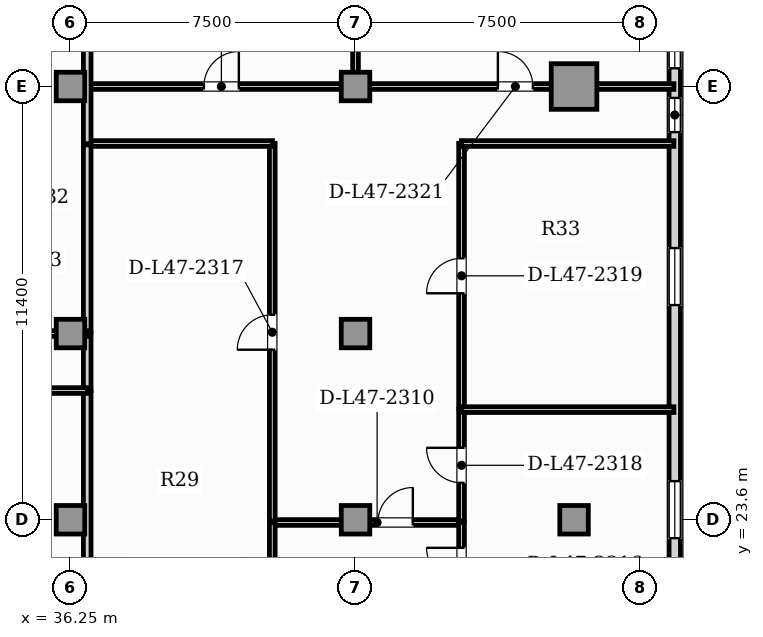
"""IFC4 building model, lengths in metres.
Left out: names, types, materials, properties, quantities, classifications, styles, units other than length and angle.
Written with IfcOpenShell. Run it as: python <this file> out.ifc"""

import sys

from ifc_helpers import new_model, si_unit, direction, frame, frame_2d, origin, origin_2d, place, context, subcontext, project, spatial, rectangle, hollow_rectangle, extrude, element, fill, save


model = new_model("IFC4")
c1 = context("Model", 3, precision=1e-05, world=origin(), true_north=direction((0.0, 1.0)))
c2 = subcontext(c1, "Body", "Model", "MODEL_VIEW")
j1 = project(units=[si_unit("LENGTHUNIT", "METRE"), si_unit("PLANEANGLEUNIT", "RADIAN")], contexts=[c1])
p1 = place(None, origin())
s1 = spatial("IfcSite", under=j1, at=p1, CompositionType="ELEMENT")
p2 = place(p1, origin())
s2 = spatial("IfcBuilding", under=s1, at=p2, CompositionType="ELEMENT")
p3 = place(p2, frame((0.0, 0.0, 192.6)))
s3 = spatial("IfcBuildingStorey", under=s2, at=p3, CompositionType="ELEMENT", Elevation=192.6)
p4 = place(p3, frame((49.5, 35.0, 0.0), z_axis=(0.0, 0.0, 1.0), x_axis=(1.0, 0.0, 0.0)))
e1 = element("IfcColumn", 1, at=p4, inside=s3, PredefinedType="USERDEFINED", context=c2, shape_type="SweptSolid", body=[
    extrude(hollow_rectangle(XDim=1.2, YDim=1.2, WallThickness=0.07, at=origin_2d()), origin(), (0.0, 0.0, 1.0), 3.85),
])
for number, where, z_axis, x_axis in (
    (2, (36.25, 23.6, 0.0), (0.0, 0.0, 1.0), (1.0, 0.0, 0.0)),
    (3, (43.75, 23.6, 0.0), (0.0, 0.0, 1.0), (1.0, 0.0, 0.0)),
    (4, (49.5, 23.6, 0.0), (0.0, 0.0, 1.0), (1.0, 0.0, 0.0)),
    (5, (36.25, 28.5, 0.0), (0.0, 0.0, 1.0), (1.0, 0.0, 0.0)),
    (6, (43.75, 28.5, 0.0), (0.0, 0.0, 1.0), (1.0, 0.0, 0.0)),
    (7, (36.25, 35.0, 0.0), (0.0, 0.0, 1.0), (1.0, 0.0, 0.0)),
    (8, (43.75, 35.0, 0.0), (0.0, 0.0, 1.0), (1.0, 0.0, 0.0)),
):
    element("IfcColumn", number, at=place(p3, frame(where, z_axis=z_axis, x_axis=x_axis)), inside=s3, PredefinedType="COLUMN", context=c2, shape_type="SweptSolid", body=[
        extrude(rectangle(XDim=0.75, YDim=0.75, at=origin_2d()), origin(), (0.0, 0.0, 1.0), 3.85),
    ])
p5 = place(p3, frame((52.15, 3.24, 0.0), z_axis=(0.0, 0.0, 1.0), x_axis=(0.0, 1.0, 0.0)))
e9 = element("IfcWall", 9, at=p5, inside=s3, PredefinedType="SOLIDWALL", context=c2, shape_type="SweptSolid", body=[
    extrude(rectangle(XDim=33.92, YDim=0.3, at=frame_2d((16.96, 0.0))), origin(), (0.0, 0.0, 1.0), 3.63),
])
p6 = place(p5, frame((30.56, 0.0, 0.95)))
e10 = element("IfcOpeningElement", 10, at=p6, cuts=e9, PredefinedType="OPENING", context=c2, shape_type="SweptSolid", body=[
    extrude(rectangle(XDim=0.9, YDim=1.5, at=frame_2d((0.45, 0.75))), frame((0.0, 0.16, 0.0), z_axis=(0.0, -1.0, 0.0), x_axis=(1.0, 0.0, 0.0)), (0.0, 0.0, 1.0), 0.32),
])
p7 = place(p5, frame((10.88, 0.0, 0.9)))
e11 = element("IfcOpeningElement", 11, at=p7, cuts=e9, PredefinedType="OPENING", context=c2, shape_type="SweptSolid", body=[
    extrude(rectangle(XDim=1.5, YDim=1.95, at=frame_2d((0.75, 0.975))), frame((0.0, 0.16, 0.0), z_axis=(0.0, -1.0, 0.0), x_axis=(1.0, 0.0, 0.0)), (0.0, 0.0, 1.0), 0.32),
])
p8 = place(p5, frame((14.613, 0.0, 0.9)))
e12 = element("IfcOpeningElement", 12, at=p8, cuts=e9, PredefinedType="OPENING", context=c2, shape_type="SweptSolid", body=[
    extrude(rectangle(XDim=1.5, YDim=1.95, at=frame_2d((0.75, 0.975))), frame((0.0, 0.16, 0.0), z_axis=(0.0, -1.0, 0.0), x_axis=(1.0, 0.0, 0.0)), (0.0, 0.0, 1.0), 0.32),
])
p9 = place(p5, frame((19.876, 0.0, 0.9)))
e13 = element("IfcOpeningElement", 13, at=p9, cuts=e9, PredefinedType="OPENING", context=c2, shape_type="SweptSolid", body=[
    extrude(rectangle(XDim=1.5, YDim=1.95, at=frame_2d((0.75, 0.975))), frame((0.0, 0.16, 0.0), z_axis=(0.0, -1.0, 0.0), x_axis=(1.0, 0.0, 0.0)), (0.0, 0.0, 1.0), 0.32),
])
p10 = place(p5, frame((26.009, 0.0, 0.9)))
e14 = element("IfcOpeningElement", 14, at=p10, cuts=e9, PredefinedType="OPENING", context=c2, shape_type="SweptSolid", body=[
    extrude(rectangle(XDim=1.5, YDim=1.95, at=frame_2d((0.75, 0.975))), frame((0.0, 0.16, 0.0), z_axis=(0.0, -1.0, 0.0), x_axis=(1.0, 0.0, 0.0)), (0.0, 0.0, 1.0), 0.32),
])
p11 = place(p5, frame((32.24, 0.0, 0.95)))
e15 = element("IfcOpeningElement", 15, at=p11, cuts=e9, PredefinedType="OPENING", context=c2, shape_type="SweptSolid", body=[
    extrude(rectangle(XDim=0.9, YDim=1.5, at=frame_2d((0.45, 0.75))), frame((0.0, 0.16, 0.0), z_axis=(0.0, -1.0, 0.0), x_axis=(1.0, 0.0, 0.0)), (0.0, 0.0, 1.0), 0.32),
])
p12 = place(p3, frame((41.555, 23.528, 0.0), z_axis=(0.0, 0.0, 1.0), x_axis=(1.0, 0.0, 0.0)))
e16 = element("IfcWall", 16, at=p12, inside=s3, PredefinedType="PARTITIONING", context=c2, shape_type="SweptSolid", body=[
    extrude(rectangle(XDim=4.99, YDim=0.15, at=frame_2d((2.495, 0.0))), origin(), (0.0, 0.0, 1.0), 3.085),
])
p13 = place(p12, frame((2.783, 0.0, 0.0)))
e17 = element("IfcOpeningElement", 17, at=p13, cuts=e16, PredefinedType="OPENING", context=c2, shape_type="SweptSolid", body=[
    extrude(rectangle(XDim=0.92, YDim=2.1, at=frame_2d((0.46, 1.05))), frame((0.0, 0.085, 0.0), z_axis=(0.0, -1.0, 0.0), x_axis=(1.0, 0.0, 0.0)), (0.0, 0.0, 1.0), 0.17),
])
p14 = place(p3, frame((41.56, 17.862, 0.0), z_axis=(0.0, 0.0, 1.0), x_axis=(0.0, 1.0, 0.0)))
e18 = element("IfcWall", 18, at=p14, inside=s3, PredefinedType="PARTITIONING", context=c2, shape_type="SweptSolid", body=[
    extrude(rectangle(XDim=5.671, YDim=0.15, at=frame_2d((2.835, 0.0))), origin(), (0.0, 0.0, 1.0), 3.63),
])
p15 = place(p14, frame((2.375, 0.0, 0.0)))
e19 = element("IfcOpeningElement", 19, at=p15, cuts=e18, PredefinedType="OPENING", context=c2, shape_type="SweptSolid", body=[
    extrude(rectangle(XDim=0.92, YDim=2.1, at=frame_2d((0.46, 1.05))), frame((0.0, 0.085, 0.0), z_axis=(0.0, -1.0, 0.0), x_axis=(1.0, 0.0, 0.0)), (0.0, 0.0, 1.0), 0.17),
])
p16 = place(p3, frame((46.54, 21.27, 0.0), z_axis=(0.0, 0.0, 1.0), x_axis=(0.0, 1.0, 0.0)))
e20 = element("IfcWall", 20, at=p16, inside=s3, PredefinedType="PARTITIONING", context=c2, shape_type="SweptSolid", body=[
    extrude(rectangle(XDim=2.264, YDim=0.15, at=frame_2d((1.132, 0.0))), origin(), (0.0, 0.0, 1.0), 3.63),
])
p17 = place(p16, frame((0.672, 0.0, 0.0)))
e21 = element("IfcOpeningElement", 21, at=p17, cuts=e20, PredefinedType="OPENING", context=c2, shape_type="SweptSolid", body=[
    extrude(rectangle(XDim=0.92, YDim=2.1, at=frame_2d((0.46, 1.05))), frame((0.0, 0.085, 0.0), z_axis=(0.0, -1.0, 0.0), x_axis=(1.0, 0.0, 0.0)), (0.0, 0.0, 1.0), 0.17),
])
p18 = place(p3, frame((41.56, 23.563, 0.0), z_axis=(0.0, 0.0, 1.0), x_axis=(0.0, 1.0, 0.0)))
e22 = element("IfcWall", 22, at=p18, inside=s3, PredefinedType="PARTITIONING", context=c2, shape_type="SweptSolid", body=[
    extrude(rectangle(XDim=9.942, YDim=0.15, at=frame_2d((4.971, 0.0))), origin(), (0.0, 0.0, 1.0), 3.63),
])
p19 = place(p18, frame((4.511, 0.0, 0.0)))
e23 = element("IfcOpeningElement", 23, at=p19, cuts=e22, PredefinedType="OPENING", context=c2, shape_type="SweptSolid", body=[
    extrude(rectangle(XDim=0.92, YDim=2.1, at=frame_2d((0.46, 1.05))), frame((0.0, 0.085, 0.0), z_axis=(0.0, -1.0, 0.0), x_axis=(1.0, 0.0, 0.0)), (0.0, 0.0, 1.0), 0.17),
])
p20 = place(p3, frame((36.685, 33.5, 0.0), z_axis=(0.0, 0.0, 1.0), x_axis=(1.0, 0.0, 0.0)))
e24 = element("IfcWall", 24, at=p20, inside=s3, PredefinedType="PARTITIONING", context=c2, shape_type="SweptSolid", body=[
    extrude(rectangle(XDim=4.88, YDim=0.15, at=frame_2d((2.44, 0.0))), origin(), (0.0, 0.0, 1.0), 3.63),
])
p21 = place(p3, frame((46.54, 23.563, 0.0), z_axis=(0.0, 0.0, 1.0), x_axis=(0.0, 1.0, 0.0)))
e25 = element("IfcWall", 25, at=p21, inside=s3, PredefinedType="PARTITIONING", context=c2, shape_type="SweptSolid", body=[
    extrude(rectangle(XDim=2.94, YDim=0.15, at=frame_2d((1.47, 0.0))), origin(), (0.0, 0.0, 1.0), 3.63),
])
p22 = place(p21, frame((1.01, 0.0, 0.0)))
e26 = element("IfcOpeningElement", 26, at=p22, cuts=e25, PredefinedType="OPENING", context=c2, shape_type="SweptSolid", body=[
    extrude(rectangle(XDim=0.92, YDim=2.1, at=frame_2d((0.46, 1.05))), frame((0.0, 0.085, 0.0), z_axis=(0.0, -1.0, 0.0), x_axis=(1.0, 0.0, 0.0)), (0.0, 0.0, 1.0), 0.17),
])
p23 = place(p3, frame((46.54, 26.533, 0.0), z_axis=(0.0, 0.0, 1.0), x_axis=(0.0, 1.0, 0.0)))
e27 = element("IfcWall", 27, at=p23, inside=s3, PredefinedType="PARTITIONING", context=c2, shape_type="SweptSolid", body=[
    extrude(rectangle(XDim=6.972, YDim=0.15, at=frame_2d((3.486, 0.0))), origin(), (0.0, 0.0, 1.0), 3.63),
])
p24 = place(p23, frame((3.026, 0.0, 0.0)))
e28 = element("IfcOpeningElement", 28, at=p24, cuts=e27, PredefinedType="OPENING", context=c2, shape_type="SweptSolid", body=[
    extrude(rectangle(XDim=0.92, YDim=2.1, at=frame_2d((0.46, 1.05))), frame((0.0, 0.085, 0.0), z_axis=(0.0, -1.0, 0.0), x_axis=(1.0, 0.0, 0.0)), (0.0, 0.0, 1.0), 0.17),
])
p25 = place(p3, frame((46.535, 33.5, 0.0), z_axis=(0.0, 0.0, 1.0), x_axis=(1.0, 0.0, 0.0)))
e29 = element("IfcWall", 29, at=p25, inside=s3, PredefinedType="PARTITIONING", context=c2, shape_type="SweptSolid", body=[
    extrude(rectangle(XDim=5.593, YDim=0.15, at=frame_2d((2.796, 0.0))), origin(), (0.0, 0.0, 1.0), 3.63),
])
p26 = place(p3, frame((36.685, 35.0, 0.0), z_axis=(0.0, 0.0, 1.0), x_axis=(1.0, 0.0, 0.0)))
e30 = element("IfcWall", 30, at=p26, inside=s3, PredefinedType="PARTITIONING", context=c2, shape_type="SweptSolid", body=[
    extrude(rectangle(XDim=7.07, YDim=0.15, at=frame_2d((3.535, 0.0))), origin(), (0.0, 0.0, 1.0), 3.085),
])
p27 = place(p26, frame((3.075, 0.0, 0.0)))
e31 = element("IfcOpeningElement", 31, at=p27, cuts=e30, PredefinedType="OPENING", context=c2, shape_type="SweptSolid", body=[
    extrude(rectangle(XDim=0.92, YDim=2.1, at=frame_2d((0.46, 1.05))), frame((0.0, 0.085, 0.0), z_axis=(0.0, -1.0, 0.0), x_axis=(1.0, 0.0, 0.0)), (0.0, 0.0, 1.0), 0.17),
])
p28 = place(p3, frame((43.785, 35.0, 0.0), z_axis=(0.0, 0.0, 1.0), x_axis=(1.0, 0.0, 0.0)))
e32 = element("IfcWall", 32, at=p28, inside=s3, PredefinedType="PARTITIONING", context=c2, shape_type="SweptSolid", body=[
    extrude(rectangle(XDim=8.343, YDim=0.15, at=frame_2d((4.171, 0.0))), origin(), (0.0, 0.0, 1.0), 3.085),
])
p29 = place(p28, frame((3.711, 0.0, 0.0)))
e33 = element("IfcOpeningElement", 33, at=p29, cuts=e32, PredefinedType="OPENING", context=c2, shape_type="SweptSolid", body=[
    extrude(rectangle(XDim=0.92, YDim=2.1, at=frame_2d((0.46, 1.05))), frame((0.0, 0.085, 0.0), z_axis=(0.0, -1.0, 0.0), x_axis=(1.0, 0.0, 0.0)), (0.0, 0.0, 1.0), 0.17),
])
p30 = place(p3, frame((36.69, 33.495, 0.0), z_axis=(0.0, 0.0, 1.0), x_axis=(0.0, 1.0, 0.0)))
e34 = element("IfcWall", 34, at=p30, inside=s3, PredefinedType="PARTITIONING", context=c2, shape_type="SweptSolid", body=[
    extrude(rectangle(XDim=2.638, YDim=0.2, at=frame_2d((1.319, 0.0))), origin(), (0.0, 0.0, 1.0), 3.63),
])
p31 = place(p3, frame((36.69, 26.995, 0.0), z_axis=(0.0, 0.0, 1.0), x_axis=(0.0, 1.0, 0.0)))
e35 = element("IfcWall", 35, at=p31, inside=s3, PredefinedType="PARTITIONING", context=c2, shape_type="SweptSolid", body=[
    extrude(rectangle(XDim=1.51, YDim=0.2, at=frame_2d((0.755, 0.0))), origin(), (0.0, 0.0, 1.0), 3.63),
])
p32 = place(p3, frame((36.69, 20.642, 0.0), z_axis=(0.0, 0.0, 1.0), x_axis=(0.0, 1.0, 0.0)))
e36 = element("IfcWall", 36, at=p32, inside=s3, PredefinedType="PARTITIONING", context=c2, shape_type="SweptSolid", body=[
    extrude(rectangle(XDim=6.323, YDim=0.2, at=frame_2d((3.162, 0.0))), origin(), (0.0, 0.0, 1.0), 3.63),
])
p33 = place(p3, frame((36.69, 28.535, 0.0), z_axis=(0.0, 0.0, 1.0), x_axis=(0.0, 1.0, 0.0)))
e37 = element("IfcWall", 37, at=p33, inside=s3, PredefinedType="PARTITIONING", context=c2, shape_type="SweptSolid", body=[
    extrude(rectangle(XDim=4.93, YDim=0.2, at=frame_2d((2.465, 0.0))), origin(), (0.0, 0.0, 1.0), 3.63),
])
p34 = place(p3, frame((46.535, 26.498, 0.0), z_axis=(0.0, 0.0, 1.0), x_axis=(1.0, 0.0, 0.0)))
e38 = element("IfcWall", 38, at=p34, inside=s3, PredefinedType="PARTITIONING", context=c2, shape_type="SweptSolid", body=[
    extrude(rectangle(XDim=5.593, YDim=0.15, at=frame_2d((2.796, 0.0))), origin(), (0.0, 0.0, 1.0), 3.63),
])
p35 = place(p3, frame((43.75, 34.995, 0.0), z_axis=(0.0, 0.0, 1.0), x_axis=(0.0, 1.0, 0.0)))
e39 = element("IfcWall", 39, at=p35, inside=s3, PredefinedType="PARTITIONING", context=c2, shape_type="SweptSolid", body=[
    extrude(rectangle(XDim=5.232, YDim=0.15, at=frame_2d((2.616, 0.0))), origin(), (0.0, 0.0, 1.0), 3.63),
])
p36 = place(p3, frame((31.3, 27.0, 0.0), z_axis=(0.0, 0.0, 1.0), x_axis=(1.0, 0.0, 0.0)))
e40 = element("IfcWall", 40, at=p36, inside=s3, PredefinedType="PARTITIONING", context=c2, shape_type="SweptSolid", body=[
    extrude(rectangle(XDim=5.395, YDim=0.15, at=frame_2d((2.697, 0.0))), origin(), (0.0, 0.0, 1.0), 3.63),
])
p37 = place(p3, frame((32.281, 28.5, 0.0), z_axis=(0.0, 0.0, 1.0), x_axis=(1.0, 0.0, 0.0)))
e41 = element("IfcWall", 41, at=p37, inside=s3, PredefinedType="PARTITIONING", context=c2, shape_type="SweptSolid", body=[
    extrude(rectangle(XDim=4.414, YDim=0.15, at=frame_2d((2.207, 0.0))), origin(), (0.0, 0.0, 1.0), 3.63),
])
p38 = place(p37, frame((1.747, 0.0, 0.0)))
e42 = element("IfcOpeningElement", 42, at=p38, cuts=e41, PredefinedType="OPENING", context=c2, shape_type="SweptSolid", body=[
    extrude(rectangle(XDim=0.92, YDim=2.1, at=frame_2d((0.46, 1.05))), frame((0.0, 0.085, 0.0), z_axis=(0.0, -1.0, 0.0), x_axis=(1.0, 0.0, 0.0)), (0.0, 0.0, 1.0), 0.17),
])
p39 = place(p6, origin())
e43 = element("IfcWindow", 43, at=p39, inside=s3, PartitioningType="SINGLE_PANEL", PredefinedType="WINDOW", context=c2, shape_type="SweptSolid", body=[
    extrude(rectangle(XDim=0.9, YDim=1.5, at=frame_2d((0.45, 0.75))), frame((0.0, 0.03, 0.0), z_axis=(0.0, -1.0, 0.0), x_axis=(1.0, 0.0, 0.0)), (0.0, 0.0, 1.0), 0.06),
])
fill(e10, e43)
p40 = place(p9, origin())
e44 = element("IfcWindow", 44, at=p40, inside=s3, PartitioningType="SINGLE_PANEL", PredefinedType="WINDOW", context=c2, shape_type="SweptSolid", body=[
    extrude(rectangle(XDim=1.5, YDim=1.95, at=frame_2d((0.75, 0.975))), frame((0.0, 0.03, 0.0), z_axis=(0.0, -1.0, 0.0), x_axis=(1.0, 0.0, 0.0)), (0.0, 0.0, 1.0), 0.06),
])
fill(e13, e44)
p41 = place(p10, origin())
e45 = element("IfcWindow", 45, at=p41, inside=s3, PartitioningType="SINGLE_PANEL", PredefinedType="WINDOW", context=c2, shape_type="SweptSolid", body=[
    extrude(rectangle(XDim=1.5, YDim=1.95, at=frame_2d((0.75, 0.975))), frame((0.0, 0.03, 0.0), z_axis=(0.0, -1.0, 0.0), x_axis=(1.0, 0.0, 0.0)), (0.0, 0.0, 1.0), 0.06),
])
fill(e14, e45)
p42 = place(p11, origin())
e46 = element("IfcWindow", 46, at=p42, inside=s3, PartitioningType="SINGLE_PANEL", PredefinedType="WINDOW", context=c2, shape_type="SweptSolid", body=[
    extrude(rectangle(XDim=0.9, YDim=1.5, at=frame_2d((0.45, 0.75))), frame((0.0, 0.03, 0.0), z_axis=(0.0, -1.0, 0.0), x_axis=(1.0, 0.0, 0.0)), (0.0, 0.0, 1.0), 0.06),
])
fill(e15, e46)
p43 = place(p13, origin())
e47 = element("IfcDoor", 47, at=p43, inside=s3, OperationType="SINGLE_SWING_RIGHT", PredefinedType="DOOR", context=c2, shape_type="SweptSolid", body=[
    extrude(rectangle(XDim=0.92, YDim=2.1, at=frame_2d((0.46, 1.05))), frame((0.0, 0.025, 0.0), z_axis=(0.0, -1.0, 0.0), x_axis=(1.0, 0.0, 0.0)), (0.0, 0.0, 1.0), 0.05),
])
fill(e17, e47)
p44 = place(p17, origin())
e48 = element("IfcDoor", 48, at=p44, inside=s3, OperationType="SINGLE_SWING_RIGHT", PredefinedType="DOOR", context=c2, shape_type="SweptSolid", body=[
    extrude(rectangle(XDim=0.92, YDim=2.1, at=frame_2d((0.46, 1.05))), frame((0.0, 0.025, 0.0), z_axis=(0.0, -1.0, 0.0), x_axis=(1.0, 0.0, 0.0)), (0.0, 0.0, 1.0), 0.05),
])
fill(e21, e48)
p45 = place(p19, origin())
e49 = element("IfcDoor", 49, at=p45, inside=s3, OperationType="SINGLE_SWING_LEFT", PredefinedType="DOOR", context=c2, shape_type="SweptSolid", body=[
    extrude(rectangle(XDim=0.92, YDim=2.1, at=frame_2d((0.46, 1.05))), frame((0.0, 0.025, 0.0), z_axis=(0.0, -1.0, 0.0), x_axis=(1.0, 0.0, 0.0)), (0.0, 0.0, 1.0), 0.05),
])
fill(e23, e49)
p46 = place(p22, origin())
e50 = element("IfcDoor", 50, at=p46, inside=s3, OperationType="SINGLE_SWING_RIGHT", PredefinedType="DOOR", context=c2, shape_type="SweptSolid", body=[
    extrude(rectangle(XDim=0.92, YDim=2.1, at=frame_2d((0.46, 1.05))), frame((0.0, 0.025, 0.0), z_axis=(0.0, -1.0, 0.0), x_axis=(1.0, 0.0, 0.0)), (0.0, 0.0, 1.0), 0.05),
])
fill(e26, e50)
p47 = place(p24, origin())
e51 = element("IfcDoor", 51, at=p47, inside=s3, OperationType="SINGLE_SWING_LEFT", PredefinedType="DOOR", context=c2, shape_type="SweptSolid", body=[
    extrude(rectangle(XDim=0.92, YDim=2.1, at=frame_2d((0.46, 1.05))), frame((0.0, 0.025, 0.0), z_axis=(0.0, -1.0, 0.0), x_axis=(1.0, 0.0, 0.0)), (0.0, 0.0, 1.0), 0.05),
])
fill(e28, e51)
p48 = place(p27, origin())
e52 = element("IfcDoor", 52, at=p48, inside=s3, OperationType="SINGLE_SWING_RIGHT", PredefinedType="DOOR", context=c2, shape_type="SweptSolid", body=[
    extrude(rectangle(XDim=0.92, YDim=2.1, at=frame_2d((0.46, 1.05))), frame((0.0, 0.025, 0.0), z_axis=(0.0, -1.0, 0.0), x_axis=(1.0, 0.0, 0.0)), (0.0, 0.0, 1.0), 0.05),
])
fill(e31, e52)
p49 = place(p29, origin())
e53 = element("IfcDoor", 53, at=p49, inside=s3, OperationType="SINGLE_SWING_LEFT", PredefinedType="DOOR", context=c2, shape_type="SweptSolid", body=[
    extrude(rectangle(XDim=0.92, YDim=2.1, at=frame_2d((0.46, 1.05))), frame((0.0, 0.025, 0.0), z_axis=(0.0, -1.0, 0.0), x_axis=(1.0, 0.0, 0.0)), (0.0, 0.0, 1.0), 0.05),
])
fill(e33, e53)
save(model, sys.argv[1])
